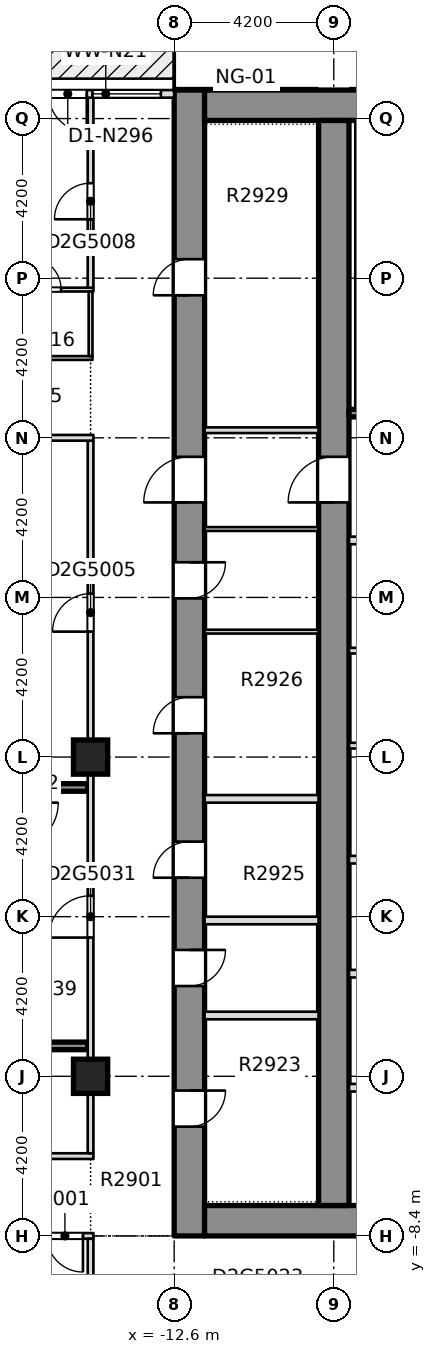
"""IFC4 building model, lengths in metres.
Left out: names, types, materials, properties, quantities, classifications, styles, units other than length and angle.
Written with IfcOpenShell. Run it as: python <this file> out.ifc"""

import sys

from ifc_helpers import new_model, si_unit, direction, frame, frame_2d, origin, origin_2d, place, context, subcontext, project, spatial, rectangle, extrude, element, fill, save


model = new_model("IFC4")
c1 = context("Model", 3, precision=1e-05, world=origin(), true_north=direction((0.0, 1.0)))
c2 = subcontext(c1, "Body", "Model", "MODEL_VIEW")
j1 = project(units=[si_unit("LENGTHUNIT", "METRE"), si_unit("PLANEANGLEUNIT", "RADIAN")], contexts=[c1])
p1 = place(None, origin())
s1 = spatial("IfcSite", under=j1, at=p1, CompositionType="ELEMENT")
p2 = place(p1, origin())
s2 = spatial("IfcBuilding", under=s1, at=p2, CompositionType="ELEMENT")
p3 = place(p2, frame((0.0, 0.0, 114.9)))
s3 = spatial("IfcBuildingStorey", under=s2, at=p3, CompositionType="ELEMENT", Elevation=114.9)
p4 = place(p3, frame((-12.2, -8.4, -0.32), z_axis=(0.0, 0.0, 1.0), x_axis=(0.0, 1.0, 0.0)))
e1 = element("IfcWall", 1, at=p4, inside=s3, PredefinedType="SHEAR", context=c2, shape_type="SweptSolid", body=[
    extrude(rectangle(XDim=30.15, YDim=0.8, at=frame_2d((15.075, 0.0))), origin(), (0.0, 0.0, 1.0), 3.45),
])
p5 = place(p4, frame((2.875, 0.0, 0.32)))
e2 = element("IfcOpeningElement", 2, at=p5, cuts=e1, PredefinedType="OPENING", context=c2, shape_type="SweptSolid", body=[
    extrude(rectangle(XDim=0.95, YDim=2.1, at=frame_2d((0.475, 1.05))), frame((0.0, 0.41, 0.0), z_axis=(0.0, -1.0, 0.0), x_axis=(1.0, 0.0, 0.0)), (0.0, 0.0, 1.0), 0.82),
])
p6 = place(p4, frame((6.575, 0.0, 0.32)))
e3 = element("IfcOpeningElement", 3, at=p6, cuts=e1, PredefinedType="OPENING", context=c2, shape_type="SweptSolid", body=[
    extrude(rectangle(XDim=0.95, YDim=2.1, at=frame_2d((0.475, 1.05))), frame((0.0, 0.41, 0.0), z_axis=(0.0, -1.0, 0.0), x_axis=(1.0, 0.0, 0.0)), (0.0, 0.0, 1.0), 0.82),
])
p7 = place(p4, frame((9.425, 0.0, 0.32)))
e4 = element("IfcOpeningElement", 4, at=p7, cuts=e1, PredefinedType="OPENING", context=c2, shape_type="SweptSolid", body=[
    extrude(rectangle(XDim=0.95, YDim=2.1, at=frame_2d((0.475, 1.05))), frame((0.0, 0.41, 0.0), z_axis=(0.0, -1.0, 0.0), x_axis=(1.0, 0.0, 0.0)), (0.0, 0.0, 1.0), 0.82),
])
p8 = place(p4, frame((13.225, 0.0, 0.32)))
e5 = element("IfcOpeningElement", 5, at=p8, cuts=e1, PredefinedType="OPENING", context=c2, shape_type="SweptSolid", body=[
    extrude(rectangle(XDim=0.95, YDim=2.1, at=frame_2d((0.475, 1.05))), frame((0.0, 0.41, 0.0), z_axis=(0.0, -1.0, 0.0), x_axis=(1.0, 0.0, 0.0)), (0.0, 0.0, 1.0), 0.82),
])
p9 = place(p4, frame((16.775, 0.0, 0.32)))
e6 = element("IfcOpeningElement", 6, at=p9, cuts=e1, PredefinedType="OPENING", context=c2, shape_type="SweptSolid", body=[
    extrude(rectangle(XDim=0.95, YDim=2.1, at=frame_2d((0.475, 1.05))), frame((0.0, 0.41, 0.0), z_axis=(0.0, -1.0, 0.0), x_axis=(1.0, 0.0, 0.0)), (0.0, 0.0, 1.0), 0.82),
])
p10 = place(p4, frame((24.75, 0.0, 0.32)))
e7 = element("IfcOpeningElement", 7, at=p10, cuts=e1, PredefinedType="OPENING", context=c2, shape_type="SweptSolid", body=[
    extrude(rectangle(XDim=0.95, YDim=2.1, at=frame_2d((0.475, 1.05))), frame((0.0, 0.41, 0.0), z_axis=(0.0, -1.0, 0.0), x_axis=(1.0, 0.0, 0.0)), (0.0, 0.0, 1.0), 0.82),
])
p11 = place(p4, frame((19.3, 0.0, 0.32)))
e8 = element("IfcOpeningElement", 8, at=p11, cuts=e1, PredefinedType="OPENING", context=c2, shape_type="SweptSolid", body=[
    extrude(rectangle(XDim=1.2, YDim=2.1, at=frame_2d((0.6, 1.05))), frame((0.0, 0.41, 0.0), z_axis=(0.0, -1.0, 0.0), x_axis=(1.0, 0.0, 0.0)), (0.0, 0.0, 1.0), 0.82),
])
p12 = place(p3, frame((-11.8, -8.0, -0.32), z_axis=(0.0, 0.0, 1.0), x_axis=(1.0, 0.0, 0.0)))
e9 = element("IfcWall", 9, at=p12, inside=s3, PredefinedType="SHEAR", context=c2, shape_type="SweptSolid", body=[
    extrude(rectangle(XDim=23.6, YDim=0.8, at=frame_2d((11.8, 0.0))), origin(), (0.0, 0.0, 1.0), 3.45),
])
p13 = place(p12, frame((7.05, 0.0, 0.32)))
e10 = element("IfcOpeningElement", 10, at=p13, cuts=e9, PredefinedType="OPENING", context=c2, shape_type="SweptSolid", body=[
    extrude(rectangle(XDim=1.8, YDim=2.1, at=frame_2d((0.9, 1.05))), frame((0.0, 0.41, 0.0), z_axis=(0.0, -1.0, 0.0), x_axis=(1.0, 0.0, 0.0)), (0.0, 0.0, 1.0), 0.82),
])
p14 = place(p12, frame((14.75, 0.0, 0.32)))
e11 = element("IfcOpeningElement", 11, at=p14, cuts=e9, PredefinedType="OPENING", context=c2, shape_type="SweptSolid", body=[
    extrude(rectangle(XDim=1.8, YDim=2.1, at=frame_2d((0.9, 1.05))), frame((0.0, 0.41, 0.0), z_axis=(0.0, -1.0, 0.0), x_axis=(1.0, 0.0, 0.0)), (0.0, 0.0, 1.0), 0.82),
])
p15 = place(p3, frame((-11.8, 21.35, -0.32), z_axis=(0.0, 0.0, 1.0), x_axis=(1.0, 0.0, 0.0)))
e12 = element("IfcWall", 12, at=p15, inside=s3, PredefinedType="SHEAR", context=c2, shape_type="SweptSolid", body=[
    extrude(rectangle(XDim=23.6, YDim=0.8, at=frame_2d((11.8, 0.0))), origin(), (0.0, 0.0, 1.0), 3.45),
])
p16 = place(p3, frame((-8.4, -7.6, -0.32), z_axis=(0.0, 0.0, 1.0), x_axis=(0.0, 1.0, 0.0)))
e13 = element("IfcWall", 13, at=p16, inside=s3, PredefinedType="SHEAR", context=c2, shape_type="SweptSolid", body=[
    extrude(rectangle(XDim=28.55, YDim=0.8, at=frame_2d((14.275, 0.0))), origin(), (0.0, 0.0, 1.0), 3.45),
])
p17 = place(p16, frame((18.5, 0.0, 0.32)))
e14 = element("IfcOpeningElement", 14, at=p17, cuts=e13, PredefinedType="OPENING", context=c2, shape_type="SweptSolid", body=[
    extrude(rectangle(XDim=1.2, YDim=2.1, at=frame_2d((0.6, 1.05))), frame((0.0, 0.41, 0.0), z_axis=(0.0, -1.0, 0.0), x_axis=(1.0, 0.0, 0.0)), (0.0, 0.0, 1.0), 0.82),
])
for number, where, z_axis, x_axis in (
    (15, (-14.8, -4.2, -0.32), (0.0, 0.0, 1.0), (1.0, 0.0, 0.0)),
    (16, (-14.8, 4.2, -0.32), (0.0, 0.0, 1.0), (1.0, 0.0, 0.0)),
):
    element("IfcColumn", number, at=place(p3, frame(where, z_axis=z_axis, x_axis=x_axis)), inside=s3, PredefinedType="COLUMN", context=c2, shape_type="SweptSolid", body=[
        extrude(rectangle(XDim=0.9, YDim=0.9, at=origin_2d()), origin(), (0.0, 0.0, 1.0), 3.45),
    ])
p18 = place(p3, frame((-25.75, -8.4, 0.0), z_axis=(0.0, 0.0, 1.0), x_axis=(1.0, 0.0, 0.0)))
e17 = element("IfcWall", 17, at=p18, inside=s3, PredefinedType="PARTITIONING", context=c2, shape_type="SweptSolid", body=[
    extrude(rectangle(XDim=11.025, YDim=0.15, at=frame_2d((5.512, 0.0))), origin(), (0.0, 0.0, 1.0), 3.13),
])
p19 = place(p18, frame((9.8, 0.0, 0.0)))
e18 = element("IfcOpeningElement", 18, at=p19, cuts=e17, PredefinedType="OPENING", context=c2, shape_type="SweptSolid", body=[
    extrude(rectangle(XDim=0.95, YDim=2.1, at=frame_2d((0.475, 1.05))), frame((0.0, 0.085, 0.0), z_axis=(0.0, -1.0, 0.0), x_axis=(1.0, 0.0, 0.0)), (0.0, 0.0, 1.0), 0.17),
])
p20 = place(p3, frame((-25.75, -6.3, 0.0), z_axis=(0.0, 0.0, 1.0), x_axis=(1.0, 0.0, 0.0)))
e19 = element("IfcWall", 19, at=p20, inside=s3, PredefinedType="PARTITIONING", context=c2, shape_type="SweptSolid", body=[
    extrude(rectangle(XDim=11.025, YDim=0.15, at=frame_2d((5.512, 0.0))), origin(), (0.0, 0.0, 1.0), 3.13),
])
p21 = place(p20, frame((4.875, 0.0, 0.0)))
e20 = element("IfcOpeningElement", 20, at=p21, cuts=e19, PredefinedType="OPENING", context=c2, shape_type="SweptSolid", body=[
    extrude(rectangle(XDim=1.0, YDim=2.1, at=frame_2d((0.5, 1.05))), frame((0.0, 0.085, 0.0), z_axis=(0.0, -1.0, 0.0), x_axis=(1.0, 0.0, 0.0)), (0.0, 0.0, 1.0), 0.17),
])
p22 = place(p3, frame((-20.4, -3.4, 0.0), z_axis=(0.0, 0.0, 1.0), x_axis=(1.0, 0.0, 0.0)))
e21 = element("IfcWall", 21, at=p22, inside=s3, PredefinedType="SOLIDWALL", context=c2, shape_type="SweptSolid", body=[
    extrude(rectangle(XDim=5.525, YDim=0.2, at=frame_2d((2.762, 0.0))), origin(), (0.0, 0.0, 1.0), 3.13),
])
p23 = place(p3, frame((-20.45, 3.4, 0.0), z_axis=(0.0, 0.0, 1.0), x_axis=(1.0, 0.0, 0.0)))
e22 = element("IfcWall", 22, at=p23, inside=s3, PredefinedType="SOLIDWALL", context=c2, shape_type="SweptSolid", body=[
    extrude(rectangle(XDim=5.575, YDim=0.2, at=frame_2d((2.788, 0.0))), origin(), (0.0, 0.0, 1.0), 3.13),
])
p24 = place(p3, frame((-17.25, 14.7, 0.0), z_axis=(0.0, 0.0, 1.0), x_axis=(1.0, 0.0, 0.0)))
e23 = element("IfcWall", 23, at=p24, inside=s3, PredefinedType="PARTITIONING", context=c2, shape_type="SweptSolid", body=[
    extrude(rectangle(XDim=2.5, YDim=0.1, at=frame_2d((1.25, 0.0))), origin(), (0.0, 0.0, 1.0), 3.13),
])
p25 = place(p3, frame((-17.25, 16.5, 0.0), z_axis=(0.0, 0.0, 1.0), x_axis=(1.0, 0.0, 0.0)))
e24 = element("IfcWall", 24, at=p25, inside=s3, PredefinedType="PARTITIONING", context=c2, shape_type="SweptSolid", body=[
    extrude(rectangle(XDim=2.525, YDim=0.1, at=frame_2d((1.262, 0.0))), origin(), (0.0, 0.0, 1.0), 3.13),
])
p26 = place(p25, frame((0.825, 0.0, 0.0)))
e25 = element("IfcOpeningElement", 25, at=p26, cuts=e24, PredefinedType="OPENING", context=c2, shape_type="SweptSolid", body=[
    extrude(rectangle(XDim=0.85, YDim=2.1, at=frame_2d((0.425, 1.05))), frame((0.0, 0.06, 0.0), z_axis=(0.0, -1.0, 0.0), x_axis=(1.0, 0.0, 0.0)), (0.0, 0.0, 1.0), 0.12),
])
p27 = place(p3, frame((-14.8, -9.82, 0.0), z_axis=(0.0, 0.0, 1.0), x_axis=(0.0, 1.0, 0.0)))
e26 = element("IfcWall", 26, at=p27, inside=s3, PredefinedType="PARTITIONING", context=c2, shape_type="SweptSolid", body=[
    extrude(rectangle(XDim=1.345, YDim=0.15, at=frame_2d((0.672, 0.0))), origin(), (0.0, 0.0, 1.0), 3.13),
])
p28 = place(p3, frame((-14.8, -6.225, 0.0), z_axis=(0.0, 0.0, 1.0), x_axis=(0.0, 1.0, 0.0)))
e27 = element("IfcWall", 27, at=p28, inside=s3, PredefinedType="PARTITIONING", context=c2, shape_type="SweptSolid", body=[
    extrude(rectangle(XDim=18.75, YDim=0.15, at=frame_2d((9.375, 0.0))), origin(), (0.0, 0.0, 1.0), 3.13),
])
p29 = place(p28, frame((13.725, 0.0, 0.0)))
e28 = element("IfcOpeningElement", 28, at=p29, cuts=e27, PredefinedType="OPENING", context=c2, shape_type="SweptSolid", body=[
    extrude(rectangle(XDim=1.0, YDim=2.1, at=frame_2d((0.5, 1.05))), frame((0.0, 0.085, 0.0), z_axis=(0.0, -1.0, 0.0), x_axis=(1.0, 0.0, 0.0)), (0.0, 0.0, 1.0), 0.17),
])
p30 = place(p28, frame((5.675, 0.0, 0.0)))
e29 = element("IfcOpeningElement", 29, at=p30, cuts=e27, PredefinedType="OPENING", context=c2, shape_type="SweptSolid", body=[
    extrude(rectangle(XDim=1.1, YDim=2.1, at=frame_2d((0.55, 1.05))), frame((0.0, 0.085, 0.0), z_axis=(0.0, -1.0, 0.0), x_axis=(1.0, 0.0, 0.0)), (0.0, 0.0, 1.0), 0.17),
])
p31 = place(p3, frame((-14.8, 14.75, 0.0), z_axis=(0.0, 0.0, 1.0), x_axis=(0.0, 1.0, 0.0)))
e30 = element("IfcWall", 30, at=p31, inside=s3, PredefinedType="PARTITIONING", context=c2, shape_type="SweptSolid", body=[
    extrude(rectangle(XDim=1.7, YDim=0.1, at=frame_2d((0.85, 0.0))), origin(), (0.0, 0.0, 1.0), 3.13),
])
p32 = place(p3, frame((-14.8, 16.55, 0.0), z_axis=(0.0, 0.0, 1.0), x_axis=(0.0, 1.0, 0.0)))
e31 = element("IfcWall", 31, at=p32, inside=s3, PredefinedType="PARTITIONING", context=c2, shape_type="SweptSolid", body=[
    extrude(rectangle(XDim=5.0, YDim=0.15, at=frame_2d((2.5, 0.0))), origin(), (0.0, 0.0, 1.0), 3.13),
])
p33 = place(p32, frame((1.8, 0.0, 0.0)))
e32 = element("IfcOpeningElement", 32, at=p33, cuts=e31, PredefinedType="OPENING", context=c2, shape_type="SweptSolid", body=[
    extrude(rectangle(XDim=0.95, YDim=2.1, at=frame_2d((0.475, 1.05))), frame((0.0, 0.085, 0.0), z_axis=(0.0, -1.0, 0.0), x_axis=(1.0, 0.0, 0.0)), (0.0, 0.0, 1.0), 0.17),
])
p34 = place(p3, frame((-12.6, 21.65, 0.0), z_axis=(0.0, 0.0, 1.0), x_axis=(-1.0, 0.0, 0.0)))
e33 = element("IfcWall", 33, at=p34, inside=s3, PredefinedType="STANDARD", context=c2, shape_type="SweptSolid", body=[
    extrude(rectangle(XDim=3.6, YDim=0.2, at=frame_2d((1.8, 0.0))), origin(), (0.0, 0.0, 1.0), 3.13),
])
p35 = place(p34, frame((0.35, 0.0, 0.2)))
e34 = element("IfcOpeningElement", 34, at=p35, cuts=e33, PredefinedType="OPENING", context=c2, shape_type="SweptSolid", body=[
    extrude(rectangle(XDim=1.8, YDim=2.65, at=frame_2d((0.9, 1.325))), frame((0.0, 0.11, 0.0), z_axis=(0.0, -1.0, 0.0), x_axis=(1.0, 0.0, 0.0)), (0.0, 0.0, 1.0), 0.22),
])
p36 = place(p34, frame((2.3, 0.0, 0.0)))
e35 = element("IfcOpeningElement", 35, at=p36, cuts=e33, PredefinedType="OPENING", context=c2, shape_type="SweptSolid", body=[
    extrude(rectangle(XDim=1.0, YDim=2.4, at=frame_2d((0.5, 1.2))), frame((0.0, 0.11, 0.0), z_axis=(0.0, -1.0, 0.0), x_axis=(1.0, 0.0, 0.0)), (0.0, 0.0, 1.0), 0.22),
])
for number, where, z_axis, x_axis in (
    (36, (-7.999, -4.5, 0.0), (0.0, 0.0, 1.0), (1.0, 0.0, 0.0)),
    (37, (-7.999, -1.5, 0.0), (0.0, 0.0, 1.0), (1.0, 0.0, 0.0)),
    (38, (-7.999, 1.5, 0.0), (0.0, 0.0, 1.0), (1.0, 0.0, 0.0)),
):
    element("IfcWall", number, at=place(p3, frame(where, z_axis=z_axis, x_axis=x_axis)), inside=s3, PredefinedType="PARTITIONING", context=c2, shape_type="SweptSolid", body=[
        extrude(rectangle(XDim=2.424, YDim=0.2, at=frame_2d((1.212, 0.0))), origin(), (0.0, 0.0, 1.0), 3.13),
    ])
p37 = place(p3, frame((-7.999, 4.5, 0.0), z_axis=(0.0, 0.0, 1.0), x_axis=(1.0, 0.0, 0.0)))
e39 = element("IfcWall", 39, at=p37, inside=s3, PredefinedType="PARTITIONING", context=c2, shape_type="SweptSolid", body=[
    extrude(rectangle(XDim=2.574, YDim=0.15, at=frame_2d((1.287, 0.0))), origin(), (0.0, 0.0, 1.0), 3.13),
])
p38 = place(p3, frame((-7.999, 7.0, 0.0), z_axis=(0.0, 0.0, 1.0), x_axis=(1.0, 0.0, 0.0)))
e40 = element("IfcWall", 40, at=p38, inside=s3, PredefinedType="PARTITIONING", context=c2, shape_type="SweptSolid", body=[
    extrude(rectangle(XDim=15.998, YDim=0.15, at=frame_2d((7.999, 0.0))), origin(), (0.0, 0.0, 1.0), 3.13),
])
p39 = place(p38, frame((7.299, 0.0, 0.0)))
e41 = element("IfcOpeningElement", 41, at=p39, cuts=e40, PredefinedType="OPENING", context=c2, shape_type="SweptSolid", body=[
    extrude(rectangle(XDim=1.4, YDim=2.1, at=frame_2d((0.7, 1.05))), frame((0.0, 0.085, 0.0), z_axis=(0.0, -1.0, 0.0), x_axis=(1.0, 0.0, 0.0)), (0.0, 0.0, 1.0), 0.17),
])
p40 = place(p3, frame((-7.999, 9.9, 0.0), z_axis=(0.0, 0.0, 1.0), x_axis=(1.0, 0.0, 0.0)))
e42 = element("IfcWall", 42, at=p40, inside=s3, PredefinedType="PARTITIONING", context=c2, shape_type="SweptSolid", body=[
    extrude(rectangle(XDim=4.399, YDim=0.2, at=frame_2d((2.199, 0.0))), origin(), (0.0, 0.0, 1.0), 3.13),
])
p41 = place(p40, frame((1.049, 0.0, 0.0)))
e43 = element("IfcOpeningElement", 43, at=p41, cuts=e42, PredefinedType="OPENING", context=c2, shape_type="SweptSolid", body=[
    extrude(rectangle(XDim=1.1, YDim=2.1, at=frame_2d((0.55, 1.05))), frame((0.0, 0.11, 0.0), z_axis=(0.0, -1.0, 0.0), x_axis=(1.0, 0.0, 0.0)), (0.0, 0.0, 1.0), 0.22),
])
p42 = place(p3, frame((-7.999, 13.25, 0.0), z_axis=(0.0, 0.0, 1.0), x_axis=(1.0, 0.0, 0.0)))
e44 = element("IfcWall", 44, at=p42, inside=s3, PredefinedType="SOLIDWALL", context=c2, shape_type="SweptSolid", body=[
    extrude(rectangle(XDim=4.574, YDim=0.2, at=frame_2d((2.287, 0.0))), origin(), (0.0, 0.0, 1.0), 3.13),
])
p43 = place(p42, frame((1.549, 0.0, 0.0)))
e45 = element("IfcOpeningElement", 45, at=p43, cuts=e44, PredefinedType="OPENING", context=c2, shape_type="SweptSolid", body=[
    extrude(rectangle(XDim=1.2, YDim=2.1, at=frame_2d((0.6, 1.05))), frame((0.0, 0.11, 0.0), z_axis=(0.0, -1.0, 0.0), x_axis=(1.0, 0.0, 0.0)), (0.0, 0.0, 1.0), 0.22),
])
for number, where, z_axis, x_axis in (
    (46, (-11.799, -2.6, 0.0), (0.0, 0.0, 1.0), (1.0, 0.0, 0.0)),
    (47, (-11.799, -0.1, 0.0), (0.0, 0.0, 1.0), (1.0, 0.0, 0.0)),
    (48, (-11.799, 3.1, 0.0), (0.0, 0.0, 1.0), (1.0, 0.0, 0.0)),
):
    element("IfcWall", number, at=place(p3, frame(where, z_axis=z_axis, x_axis=x_axis)), inside=s3, PredefinedType="PARTITIONING", context=c2, shape_type="SweptSolid", body=[
        extrude(rectangle(XDim=2.998, YDim=0.2, at=frame_2d((1.499, 0.0))), origin(), (0.0, 0.0, 1.0), 3.13),
    ])
for number, where, z_axis, x_axis in (
    (49, (-11.799, 7.5, 0.0), (0.0, 0.0, 1.0), (1.0, 0.0, 0.0)),
    (50, (-11.799, 10.2, 0.0), (0.0, 0.0, 1.0), (1.0, 0.0, 0.0)),
):
    element("IfcWall", number, at=place(p3, frame(where, z_axis=z_axis, x_axis=x_axis)), inside=s3, PredefinedType="PARTITIONING", context=c2, shape_type="SweptSolid", body=[
        extrude(rectangle(XDim=2.998, YDim=0.1, at=frame_2d((1.499, 0.0))), origin(), (0.0, 0.0, 1.0), 3.13),
    ])
p44 = place(p3, frame((-11.799, 12.8, 0.0), z_axis=(0.0, 0.0, 1.0), x_axis=(1.0, 0.0, 0.0)))
e51 = element("IfcWall", 51, at=p44, inside=s3, PredefinedType="PARTITIONING", context=c2, shape_type="SweptSolid", body=[
    extrude(rectangle(XDim=2.998, YDim=0.15, at=frame_2d((1.499, 0.0))), origin(), (0.0, 0.0, 1.0), 3.13),
])
p45 = place(p3, frame((-17.4, 12.6, 0.0), z_axis=(0.0, 0.0, 1.0), x_axis=(1.0, 0.0, 0.0)))
e52 = element("IfcWall", 52, at=p45, inside=s3, PredefinedType="PARTITIONING", context=c2, shape_type="SweptSolid", body=[
    extrude(rectangle(XDim=2.675, YDim=0.15, at=frame_2d((1.337, 0.0))), origin(), (0.0, 0.0, 1.0), 3.13),
])
p46 = place(p19, origin())
e53 = element("IfcDoor", 53, at=p46, inside=s3, OperationType="SINGLE_SWING_RIGHT", PredefinedType="DOOR", context=c2, shape_type="SweptSolid", body=[
    extrude(rectangle(XDim=0.95, YDim=2.1, at=frame_2d((0.475, 1.05))), frame((0.0, 0.025, 0.0), z_axis=(0.0, -1.0, 0.0), x_axis=(1.0, 0.0, 0.0)), (0.0, 0.0, 1.0), 0.05),
])
fill(e18, e53)
p47 = place(p29, origin())
e54 = element("IfcDoor", 54, at=p47, inside=s3, OperationType="SINGLE_SWING_LEFT", PredefinedType="DOOR", context=c2, shape_type="SweptSolid", body=[
    extrude(rectangle(XDim=1.0, YDim=2.1, at=frame_2d((0.5, 1.05))), frame((0.0, 0.025, 0.0), z_axis=(0.0, -1.0, 0.0), x_axis=(1.0, 0.0, 0.0)), (0.0, 0.0, 1.0), 0.05),
])
fill(e28, e54)
p48 = place(p33, origin())
e55 = element("IfcDoor", 55, at=p48, inside=s3, OperationType="SINGLE_SWING_RIGHT", PredefinedType="DOOR", context=c2, shape_type="SweptSolid", body=[
    extrude(rectangle(XDim=0.95, YDim=2.1, at=frame_2d((0.475, 1.05))), frame((0.0, 0.025, 0.0), z_axis=(0.0, -1.0, 0.0), x_axis=(1.0, 0.0, 0.0)), (0.0, 0.0, 1.0), 0.05),
])
fill(e32, e55)
p49 = place(p26, origin())
e56 = element("IfcDoor", 56, at=p49, inside=s3, OperationType="SINGLE_SWING_RIGHT", PredefinedType="DOOR", context=c2, shape_type="SweptSolid", body=[
    extrude(rectangle(XDim=0.85, YDim=2.1, at=frame_2d((0.425, 1.05))), frame((0.0, 0.025, 0.0), z_axis=(0.0, -1.0, 0.0), x_axis=(1.0, 0.0, 0.0)), (0.0, 0.0, 1.0), 0.05),
])
fill(e25, e56)
p50 = place(p30, origin())
e57 = element("IfcDoor", 57, at=p50, inside=s3, OperationType="SINGLE_SWING_RIGHT", PredefinedType="DOOR", context=c2, shape_type="SweptSolid", body=[
    extrude(rectangle(XDim=1.1, YDim=2.1, at=frame_2d((0.55, 1.05))), frame((0.0, 0.025, 0.0), z_axis=(0.0, -1.0, 0.0), x_axis=(1.0, 0.0, 0.0)), (0.0, 0.0, 1.0), 0.05),
])
fill(e29, e57)
p51 = place(p35, origin())
e58 = element("IfcWindow", 58, at=p51, inside=s3, PartitioningType="SINGLE_PANEL", PredefinedType="WINDOW", context=c2, shape_type="SweptSolid", body=[
    extrude(rectangle(XDim=1.8, YDim=2.65, at=frame_2d((0.9, 1.325))), frame((0.0, 0.03, 0.0), z_axis=(0.0, -1.0, 0.0), x_axis=(1.0, 0.0, 0.0)), (0.0, 0.0, 1.0), 0.06),
])
fill(e34, e58)
p52 = place(p36, origin())
e59 = element("IfcDoor", 59, at=p52, inside=s3, OperationType="SINGLE_SWING_LEFT", PredefinedType="DOOR", context=c2, shape_type="SweptSolid", body=[
    extrude(rectangle(XDim=1.0, YDim=2.4, at=frame_2d((0.5, 1.2))), frame((0.0, 0.025, 0.0), z_axis=(0.0, -1.0, 0.0), x_axis=(1.0, 0.0, 0.0)), (0.0, 0.0, 1.0), 0.05),
])
fill(e35, e59)
p53 = place(p5, origin())
e60 = element("IfcDoor", 60, at=p53, inside=s3, OperationType="SINGLE_SWING_LEFT", PredefinedType="DOOR", context=c2, shape_type="SweptSolid", body=[
    extrude(rectangle(XDim=0.95, YDim=2.1, at=frame_2d((0.475, 1.05))), frame((0.0, 0.025, 0.0), z_axis=(0.0, -1.0, 0.0), x_axis=(1.0, 0.0, 0.0)), (0.0, 0.0, 1.0), 0.05),
])
fill(e2, e60)
p54 = place(p6, origin())
e61 = element("IfcDoor", 61, at=p54, inside=s3, OperationType="SINGLE_SWING_LEFT", PredefinedType="DOOR", context=c2, shape_type="SweptSolid", body=[
    extrude(rectangle(XDim=0.95, YDim=2.1, at=frame_2d((0.475, 1.05))), frame((0.0, 0.025, 0.0), z_axis=(0.0, -1.0, 0.0), x_axis=(1.0, 0.0, 0.0)), (0.0, 0.0, 1.0), 0.05),
])
fill(e3, e61)
p55 = place(p7, origin())
e62 = element("IfcDoor", 62, at=p55, inside=s3, OperationType="SINGLE_SWING_LEFT", PredefinedType="DOOR", context=c2, shape_type="SweptSolid", body=[
    extrude(rectangle(XDim=0.95, YDim=2.1, at=frame_2d((0.475, 1.05))), frame((0.0, 0.025, 0.0), z_axis=(0.0, -1.0, 0.0), x_axis=(1.0, 0.0, 0.0)), (0.0, 0.0, 1.0), 0.05),
])
fill(e4, e62)
p56 = place(p8, origin())
e63 = element("IfcDoor", 63, at=p56, inside=s3, OperationType="SINGLE_SWING_LEFT", PredefinedType="DOOR", context=c2, shape_type="SweptSolid", body=[
    extrude(rectangle(XDim=0.95, YDim=2.1, at=frame_2d((0.475, 1.05))), frame((0.0, 0.025, 0.0), z_axis=(0.0, -1.0, 0.0), x_axis=(1.0, 0.0, 0.0)), (0.0, 0.0, 1.0), 0.05),
])
fill(e5, e63)
p57 = place(p9, origin())
e64 = element("IfcDoor", 64, at=p57, inside=s3, OperationType="SINGLE_SWING_LEFT", PredefinedType="DOOR", context=c2, shape_type="SweptSolid", body=[
    extrude(rectangle(XDim=0.95, YDim=2.1, at=frame_2d((0.475, 1.05))), frame((0.0, 0.025, 0.0), z_axis=(0.0, -1.0, 0.0), x_axis=(1.0, 0.0, 0.0)), (0.0, 0.0, 1.0), 0.05),
])
fill(e6, e64)
p58 = place(p10, origin())
e65 = element("IfcDoor", 65, at=p58, inside=s3, OperationType="SINGLE_SWING_LEFT", PredefinedType="DOOR", context=c2, shape_type="SweptSolid", body=[
    extrude(rectangle(XDim=0.95, YDim=2.1, at=frame_2d((0.475, 1.05))), frame((0.0, 0.025, 0.0), z_axis=(0.0, -1.0, 0.0), x_axis=(1.0, 0.0, 0.0)), (0.0, 0.0, 1.0), 0.05),
])
fill(e7, e65)
p59 = place(p11, origin())
e66 = element("IfcDoor", 66, at=p59, inside=s3, OperationType="SINGLE_SWING_LEFT", PredefinedType="DOOR", context=c2, shape_type="SweptSolid", body=[
    extrude(rectangle(XDim=1.2, YDim=2.1, at=frame_2d((0.6, 1.05))), frame((0.0, 0.025, 0.0), z_axis=(0.0, -1.0, 0.0), x_axis=(1.0, 0.0, 0.0)), (0.0, 0.0, 1.0), 0.05),
])
fill(e8, e66)
p60 = place(p17, origin())
e67 = element("IfcDoor", 67, at=p60, inside=s3, OperationType="SINGLE_SWING_LEFT", PredefinedType="DOOR", context=c2, shape_type="SweptSolid", body=[
    extrude(rectangle(XDim=1.2, YDim=2.1, at=frame_2d((0.6, 1.05))), frame((0.0, 0.025, 0.0), z_axis=(0.0, -1.0, 0.0), x_axis=(1.0, 0.0, 0.0)), (0.0, 0.0, 1.0), 0.05),
])
fill(e14, e67)
save(model, sys.argv[1])
